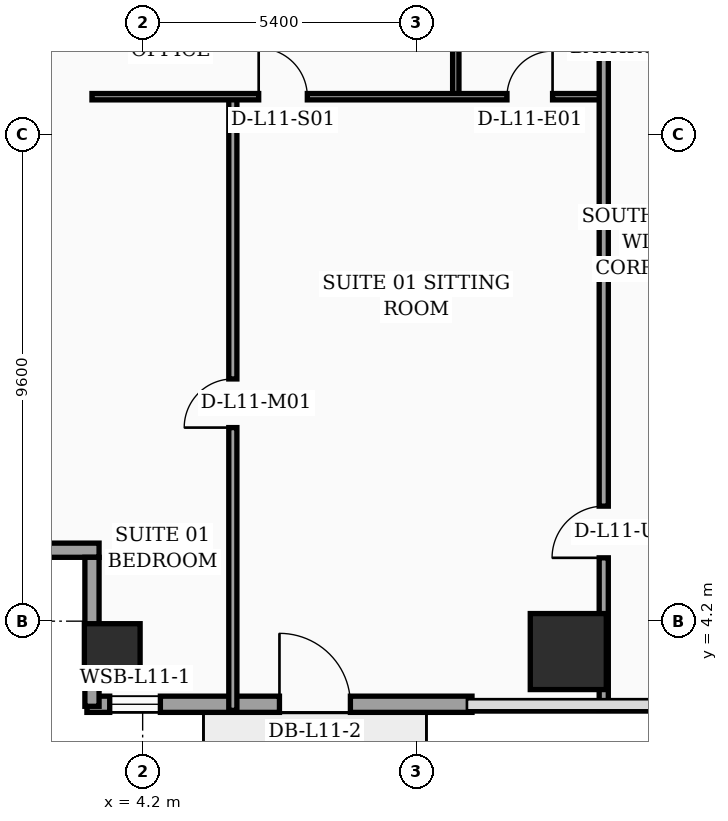
"""IFC4 building model, lengths in metres.
Left out: names, types, materials, properties, quantities, classifications, styles, units other than length and angle.
Written with IfcOpenShell. Run it as: python <this file> out.ifc"""

import sys

from ifc_helpers import new_model, si_unit, direction, frame, frame_2d, origin, origin_2d, place, context, subcontext, project, spatial, rectangle, hollow_rectangle, extrude, element, fill, save


model = new_model("IFC4")
c1 = context("Model", 3, precision=1e-05, world=origin(), true_north=direction((0.0, 1.0)))
c2 = subcontext(c1, "Body", "Model", "MODEL_VIEW")
j1 = project(units=[si_unit("LENGTHUNIT", "METRE"), si_unit("PLANEANGLEUNIT", "RADIAN")], contexts=[c1])
p1 = place(None, origin())
s1 = spatial("IfcSite", under=j1, at=p1, CompositionType="ELEMENT")
p2 = place(p1, origin())
s2 = spatial("IfcBuilding", under=s1, at=p2, CompositionType="ELEMENT")
p3 = place(p2, frame((0.0, 0.0, 50.8)))
s3 = spatial("IfcBuildingStorey", under=s2, at=p3, CompositionType="ELEMENT", Elevation=50.8)
p4 = place(p3, frame((3.6, 3.6, 0.0), z_axis=(0.0, 0.0, 1.0), x_axis=(1.0, 0.0, 0.0)))
e1 = element("IfcColumn", 1, at=p4, inside=s3, PredefinedType="COLUMN", context=c2, shape_type="SweptSolid", body=[
    extrude(hollow_rectangle(XDim=1.1, YDim=1.1, WallThickness=0.045, at=origin_2d()), origin(), (0.0, 0.0, 1.0), 3.56),
])
p5 = place(p3, frame((12.6, 3.6, 0.0), z_axis=(0.0, 0.0, 1.0), x_axis=(1.0, 0.0, 0.0)))
e2 = element("IfcColumn", 2, at=p5, inside=s3, PredefinedType="COLUMN", context=c2, shape_type="SweptSolid", body=[
    extrude(rectangle(XDim=1.5, YDim=1.5, at=origin_2d()), origin(), (0.0, 0.0, 1.0), 3.56),
])
p6 = place(p3, frame((3.1, 2.56, 0.0), z_axis=(0.0, 0.0, 1.0), x_axis=(1.0, 0.0, 0.0)))
e3 = element("IfcWall", 3, at=p6, inside=s3, PredefinedType="SOLIDWALL", context=c2, shape_type="SweptSolid", body=[
    extrude(rectangle(XDim=7.6, YDim=0.32, at=frame_2d((3.8, 0.0))), origin(), (0.0, 0.0, 1.0), 3.56),
])
p7 = place(p6, frame((0.45, 0.0, 0.75)))
e4 = element("IfcOpeningElement", 4, at=p7, cuts=e3, PredefinedType="OPENING", context=c2, shape_type="SweptSolid", body=[
    extrude(rectangle(XDim=1.0, YDim=1.6, at=frame_2d((0.5, 0.8))), frame((0.0, 0.17, 0.0), z_axis=(0.0, -1.0, 0.0), x_axis=(1.0, 0.0, 0.0)), (0.0, 0.0, 1.0), 0.34),
])
p8 = place(p6, frame((3.8, 0.0, 0.0)))
e5 = element("IfcOpeningElement", 5, at=p8, cuts=e3, PredefinedType="OPENING", context=c2, shape_type="SweptSolid", body=[
    extrude(rectangle(XDim=1.4, YDim=2.25, at=frame_2d((0.7, 1.125))), frame((0.0, 0.17, 0.0), z_axis=(0.0, -1.0, 0.0), x_axis=(1.0, 0.0, 0.0)), (0.0, 0.0, 1.0), 0.34),
])
p9 = place(p3, frame((0.12, 5.6, 0.0), z_axis=(0.0, 0.0, 1.0), x_axis=(1.0, 0.0, 0.0)))
e6 = element("IfcWall", 6, at=p9, inside=s3, PredefinedType="SOLIDWALL", context=c2, shape_type="SweptSolid", body=[
    extrude(rectangle(XDim=3.22, YDim=0.28, at=frame_2d((1.61, 0.0))), origin(), (0.0, 0.0, 1.0), 2.84),
])
p10 = place(p3, frame((3.2, 5.46, 0.0), z_axis=(0.0, 0.0, 1.0), x_axis=(0.0, -1.0, 0.0)))
e7 = element("IfcWall", 7, at=p10, inside=s3, PredefinedType="SOLIDWALL", context=c2, shape_type="SweptSolid", body=[
    extrude(rectangle(XDim=2.94, YDim=0.28, at=frame_2d((1.47, 0.0))), origin(), (0.0, 0.0, 1.0), 2.84),
])
p11 = place(p3, frame((10.38, 14.55, 0.0), z_axis=(0.0, 0.0, 1.0), x_axis=(0.0, 1.0, 0.0)))
e8 = element("IfcWall", 8, at=p11, inside=s3, PredefinedType="PARTITIONING", context=c2, shape_type="SweptSolid", body=[
    extrude(rectangle(XDim=2.25, YDim=0.125, at=frame_2d((1.125, 0.0))), origin(), (0.0, 0.0, 1.0), 3.56),
])
p12 = place(p3, frame((5.98, 2.44, 0.0), z_axis=(0.0, 0.0, 1.0), x_axis=(0.0, 1.0, 0.0)))
e9 = element("IfcWall", 9, at=p12, inside=s3, PredefinedType="PARTITIONING", context=c2, shape_type="SweptSolid", body=[
    extrude(rectangle(XDim=12.11, YDim=0.16, at=frame_2d((6.055, 0.0))), origin(), (0.0, 0.0, 1.0), 3.04),
])
p13 = place(p12, frame((5.58, 0.0, 0.0)))
e10 = element("IfcOpeningElement", 10, at=p13, cuts=e9, PredefinedType="OPENING", context=c2, shape_type="SweptSolid", body=[
    extrude(rectangle(XDim=0.96, YDim=2.2, at=frame_2d((0.48, 1.1))), frame((0.0, 0.09, 0.0), z_axis=(0.0, -1.0, 0.0), x_axis=(1.0, 0.0, 0.0)), (0.0, 0.0, 1.0), 0.18),
])
p14 = place(p3, frame((3.2, 14.55, 0.0), z_axis=(0.0, 0.0, 1.0), x_axis=(1.0, 0.0, 0.0)))
e11 = element("IfcWall", 11, at=p14, inside=s3, PredefinedType="PARTITIONING", context=c2, shape_type="SweptSolid", body=[
    extrude(rectangle(XDim=10.1, YDim=0.125, at=frame_2d((5.05, 0.0))), origin(), (0.0, 0.0, 1.0), 2.84),
])
p15 = place(p14, frame((3.29, 0.0, 0.0)))
e12 = element("IfcOpeningElement", 12, at=p15, cuts=e11, PredefinedType="OPENING", context=c2, shape_type="SweptSolid", body=[
    extrude(rectangle(XDim=0.96, YDim=2.2, at=frame_2d((0.48, 1.1))), frame((0.0, 0.073, 0.0), z_axis=(0.0, -1.0, 0.0), x_axis=(1.0, 0.0, 0.0)), (0.0, 0.0, 1.0), 0.145),
])
p16 = place(p14, frame((8.19, 0.0, 0.0)))
e13 = element("IfcOpeningElement", 13, at=p16, cuts=e11, PredefinedType="OPENING", context=c2, shape_type="SweptSolid", body=[
    extrude(rectangle(XDim=0.9, YDim=2.15, at=frame_2d((0.45, 1.075))), frame((0.0, 0.073, 0.0), z_axis=(0.0, -1.0, 0.0), x_axis=(1.0, 0.0, 0.0)), (0.0, 0.0, 1.0), 0.145),
])
p17 = place(p3, frame((13.3, 2.44, 0.0), z_axis=(0.0, 0.0, 1.0), x_axis=(0.0, 1.0, 0.0)))
e14 = element("IfcWall", 14, at=p17, inside=s3, PredefinedType="PARTITIONING", context=c2, shape_type="SweptSolid", body=[
    extrude(rectangle(XDim=14.36, YDim=0.18, at=frame_2d((7.18, 0.0))), origin(), (0.0, 0.0, 1.0), 3.04),
])
p18 = place(p17, frame((3.01, 0.0, 0.0)))
e15 = element("IfcOpeningElement", 15, at=p18, cuts=e14, PredefinedType="OPENING", context=c2, shape_type="SweptSolid", body=[
    extrude(rectangle(XDim=1.02, YDim=2.2, at=frame_2d((0.51, 1.1))), frame((0.0, 0.1, 0.0), z_axis=(0.0, -1.0, 0.0), x_axis=(1.0, 0.0, 0.0)), (0.0, 0.0, 1.0), 0.2),
])
p19 = place(p7, origin())
e16 = element("IfcWindow", 16, at=p19, inside=s3, PartitioningType="SINGLE_PANEL", PredefinedType="WINDOW", context=c2, shape_type="SweptSolid", body=[
    extrude(rectangle(XDim=1.0, YDim=1.6, at=frame_2d((0.5, 0.8))), frame((0.0, 0.03, 0.0), z_axis=(0.0, -1.0, 0.0), x_axis=(1.0, 0.0, 0.0)), (0.0, 0.0, 1.0), 0.06),
])
fill(e4, e16)
p20 = place(p8, origin())
e17 = element("IfcDoor", 17, at=p20, inside=s3, OperationType="SINGLE_SWING_LEFT", PredefinedType="DOOR", context=c2, shape_type="SweptSolid", body=[
    extrude(rectangle(XDim=1.4, YDim=2.25, at=frame_2d((0.7, 1.125))), frame((0.0, 0.025, 0.0), z_axis=(0.0, -1.0, 0.0), x_axis=(1.0, 0.0, 0.0)), (0.0, 0.0, 1.0), 0.05),
])
fill(e5, e17)
p21 = place(p13, origin())
e18 = element("IfcDoor", 18, at=p21, inside=s3, OperationType="SINGLE_SWING_LEFT", PredefinedType="DOOR", context=c2, shape_type="SweptSolid", body=[
    extrude(rectangle(XDim=0.96, YDim=2.2, at=frame_2d((0.48, 1.1))), frame((0.0, 0.025, 0.0), z_axis=(0.0, -1.0, 0.0), x_axis=(1.0, 0.0, 0.0)), (0.0, 0.0, 1.0), 0.05),
])
fill(e10, e18)
p22 = place(p15, origin())
e19 = element("IfcDoor", 19, at=p22, inside=s3, OperationType="SINGLE_SWING_LEFT", PredefinedType="DOOR", context=c2, shape_type="SweptSolid", body=[
    extrude(rectangle(XDim=0.96, YDim=2.2, at=frame_2d((0.48, 1.1))), frame((0.0, 0.025, 0.0), z_axis=(0.0, -1.0, 0.0), x_axis=(1.0, 0.0, 0.0)), (0.0, 0.0, 1.0), 0.05),
])
fill(e12, e19)
p23 = place(p16, origin())
e20 = element("IfcDoor", 20, at=p23, inside=s3, OperationType="SINGLE_SWING_RIGHT", PredefinedType="DOOR", context=c2, shape_type="SweptSolid", body=[
    extrude(rectangle(XDim=0.9, YDim=2.15, at=frame_2d((0.45, 1.075))), frame((0.0, 0.025, 0.0), z_axis=(0.0, -1.0, 0.0), x_axis=(1.0, 0.0, 0.0)), (0.0, 0.0, 1.0), 0.05),
])
fill(e13, e20)
p24 = place(p18, origin())
e21 = element("IfcDoor", 21, at=p24, inside=s3, OperationType="SINGLE_SWING_LEFT", PredefinedType="DOOR", context=c2, shape_type="SweptSolid", body=[
    extrude(rectangle(XDim=1.02, YDim=2.2, at=frame_2d((0.51, 1.1))), frame((0.0, 0.025, 0.0), z_axis=(0.0, -1.0, 0.0), x_axis=(1.0, 0.0, 0.0)), (0.0, 0.0, 1.0), 0.05),
])
fill(e15, e21)
save(model, sys.argv[1])
